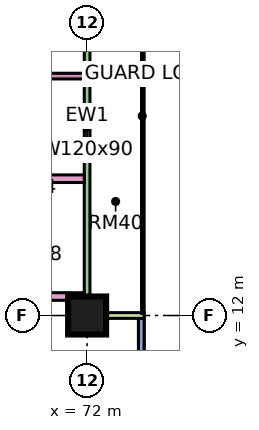
"""IFC4 building model, lengths in metres.
Left out: names, types, materials, properties, quantities, classifications, styles, units other than length and angle.
Written with IfcOpenShell. Run it as: python <this file> out.ifc"""

import sys

from ifc_helpers import new_model, si_unit, direction, frame, frame_2d, origin, origin_2d, place, context, subcontext, project, spatial, rectangle, extrude, element, fill, save


model = new_model("IFC4")
c1 = context("Model", 3, precision=1e-05, world=origin(), true_north=direction((0.0, 1.0)))
c2 = subcontext(c1, "Body", "Model", "MODEL_VIEW")
j1 = project(units=[si_unit("LENGTHUNIT", "METRE"), si_unit("PLANEANGLEUNIT", "RADIAN")], contexts=[c1])
p1 = place(None, origin())
s1 = spatial("IfcSite", under=j1, at=p1, CompositionType="ELEMENT")
p2 = place(p1, origin())
s2 = spatial("IfcBuilding", under=s1, at=p2, CompositionType="ELEMENT")
p3 = place(p2, frame((0.0, 0.0, 133.15)))
s3 = spatial("IfcBuildingStorey", under=s2, at=p3, CompositionType="ELEMENT", Elevation=133.15)
p4 = place(p3, frame((72.0, 12.0, 0.0), z_axis=(0.0, 0.0, 1.0), x_axis=(1.0, 0.0, 0.0)))
e1 = element("IfcColumn", 1, at=p4, inside=s3, PredefinedType="COLUMN", context=c2, shape_type="SweptSolid", body=[
    extrude(rectangle(XDim=1.0, YDim=1.0, at=origin_2d()), origin(), (0.0, 0.0, 1.0), 3.75),
])
p5 = place(p3, frame((73.425, 1.5, 0.0), z_axis=(0.0, 0.0, 1.0), x_axis=(0.0, 1.0, 0.0)))
e2 = element("IfcWall", 2, at=p5, inside=s3, PredefinedType="SOLIDWALL", context=c2, shape_type="SweptSolid", body=[
    extrude(rectangle(XDim=10.425, YDim=0.15, at=frame_2d((5.212, 0.0))), origin(), (0.0, 0.0, 1.0), 3.35),
])
p6 = place(p5, frame((0.7, 0.0, 0.45)))
e3 = element("IfcOpeningElement", 3, at=p6, cuts=e2, PredefinedType="OPENING", context=c2, shape_type="SweptSolid", body=[
    extrude(rectangle(XDim=3.0, YDim=2.4, at=frame_2d((1.5, 1.2))), frame((0.0, 0.085, 0.0), z_axis=(0.0, -1.0, 0.0), x_axis=(1.0, 0.0, 0.0)), (0.0, 0.0, 1.0), 0.17),
])
p7 = place(p3, frame((72.0, 12.075, 0.0), z_axis=(0.0, 0.0, 1.0), x_axis=(0.0, 1.0, 0.0)))
e4 = element("IfcWall", 4, at=p7, inside=s3, PredefinedType="SOLIDWALL", context=c2, shape_type="SweptSolid", body=[
    extrude(rectangle(XDim=10.35, YDim=0.15, at=frame_2d((5.175, 0.0))), origin(), (0.0, 0.0, 1.0), 3.35),
])
p8 = place(p7, frame((4.275, 0.0, 1.7)))
e5 = element("IfcOpeningElement", 5, at=p8, cuts=e4, PredefinedType="OPENING", context=c2, shape_type="SweptSolid", body=[
    extrude(rectangle(XDim=1.2, YDim=0.9, at=frame_2d((0.6, 0.45))), frame((0.0, 0.085, 0.0), z_axis=(0.0, -1.0, 0.0), x_axis=(1.0, 0.0, 0.0)), (0.0, 0.0, 1.0), 0.17),
])
p9 = place(p7, frame((7.988, 0.0, 0.45)))
e6 = element("IfcOpeningElement", 6, at=p9, cuts=e4, PredefinedType="OPENING", context=c2, shape_type="SweptSolid", body=[
    extrude(rectangle(XDim=1.8, YDim=2.4, at=frame_2d((0.9, 1.2))), frame((0.0, 0.085, 0.0), z_axis=(0.0, -1.0, 0.0), x_axis=(1.0, 0.0, 0.0)), (0.0, 0.0, 1.0), 0.17),
])
p10 = place(p3, frame((73.5, 12.0, 0.0), z_axis=(0.0, 0.0, 1.0), x_axis=(-1.0, 0.0, 0.0)))
e7 = element("IfcWall", 7, at=p10, inside=s3, PredefinedType="SOLIDWALL", context=c2, shape_type="SweptSolid", body=[
    extrude(rectangle(XDim=1.5, YDim=0.15, at=frame_2d((0.75, 0.0))), origin(), (0.0, 0.0, 1.0), 3.35),
])
p11 = place(p3, frame((40.65, 12.5, 0.0), z_axis=(0.0, 0.0, 1.0), x_axis=(1.0, 0.0, 0.0)))
e8 = element("IfcWall", 8, at=p11, inside=s3, PredefinedType="PARTITIONING", context=c2, shape_type="SweptSolid", body=[
    extrude(rectangle(XDim=31.276, YDim=0.2, at=frame_2d((15.638, 0.0))), origin(), (0.0, 0.0, 1.0), 3.35),
])
p12 = place(p11, frame((29.1, 0.0, 0.0)))
e9 = element("IfcOpeningElement", 9, at=p12, cuts=e8, PredefinedType="OPENING", context=c2, shape_type="SweptSolid", body=[
    extrude(rectangle(XDim=1.0, YDim=2.1, at=frame_2d((0.5, 1.05))), frame((0.0, 0.11, 0.0), z_axis=(0.0, -1.0, 0.0), x_axis=(1.0, 0.0, 0.0)), (0.0, 0.0, 1.0), 0.22),
])
p13 = place(p11, frame((1.05, 0.0, 0.0)))
e10 = element("IfcOpeningElement", 10, at=p13, cuts=e8, PredefinedType="OPENING", context=c2, shape_type="SweptSolid", body=[
    extrude(rectangle(XDim=1.0, YDim=2.1, at=frame_2d((0.5, 1.05))), frame((0.0, 0.11, 0.0), z_axis=(0.0, -1.0, 0.0), x_axis=(1.0, 0.0, 0.0)), (0.0, 0.0, 1.0), 0.22),
])
p14 = place(p3, frame((51.225, 15.6, 0.0), z_axis=(0.0, 0.0, 1.0), x_axis=(1.0, 0.0, 0.0)))
e11 = element("IfcWall", 11, at=p14, inside=s3, PredefinedType="PARTITIONING", context=c2, shape_type="SweptSolid", body=[
    extrude(rectangle(XDim=20.701, YDim=0.2, at=frame_2d((10.351, 0.0))), origin(), (0.0, 0.0, 1.0), 3.35),
])
p15 = place(p14, frame((15.875, 0.0, 0.0)))
e12 = element("IfcOpeningElement", 12, at=p15, cuts=e11, PredefinedType="OPENING", context=c2, shape_type="SweptSolid", body=[
    extrude(rectangle(XDim=1.0, YDim=2.1, at=frame_2d((0.5, 1.05))), frame((0.0, 0.11, 0.0), z_axis=(0.0, -1.0, 0.0), x_axis=(1.0, 0.0, 0.0)), (0.0, 0.0, 1.0), 0.22),
])
p16 = place(p14, frame((0.875, 0.0, 0.0)))
e13 = element("IfcOpeningElement", 13, at=p16, cuts=e11, PredefinedType="OPENING", context=c2, shape_type="SweptSolid", body=[
    extrude(rectangle(XDim=1.0, YDim=2.1, at=frame_2d((0.5, 1.05))), frame((0.0, 0.11, 0.0), z_axis=(0.0, -1.0, 0.0), x_axis=(1.0, 0.0, 0.0)), (0.0, 0.0, 1.0), 0.22),
])
p17 = place(p3, frame((69.375, 18.3, 0.0), z_axis=(0.0, 0.0, 1.0), x_axis=(1.0, 0.0, 0.0)))
e14 = element("IfcWall", 14, at=p17, inside=s3, PredefinedType="PARTITIONING", context=c2, shape_type="SweptSolid", body=[
    extrude(rectangle(XDim=2.551, YDim=0.15, at=frame_2d((1.275, 0.0))), origin(), (0.0, 0.0, 1.0), 3.35),
])
p18 = place(p8, origin())
e15 = element("IfcWindow", 15, at=p18, inside=s3, PartitioningType="SINGLE_PANEL", PredefinedType="WINDOW", context=c2, shape_type="SweptSolid", body=[
    extrude(rectangle(XDim=1.2, YDim=0.9, at=frame_2d((0.6, 0.45))), frame((0.0, 0.03, 0.0), z_axis=(0.0, -1.0, 0.0), x_axis=(1.0, 0.0, 0.0)), (0.0, 0.0, 1.0), 0.06),
])
fill(e5, e15)
save(model, sys.argv[1])
